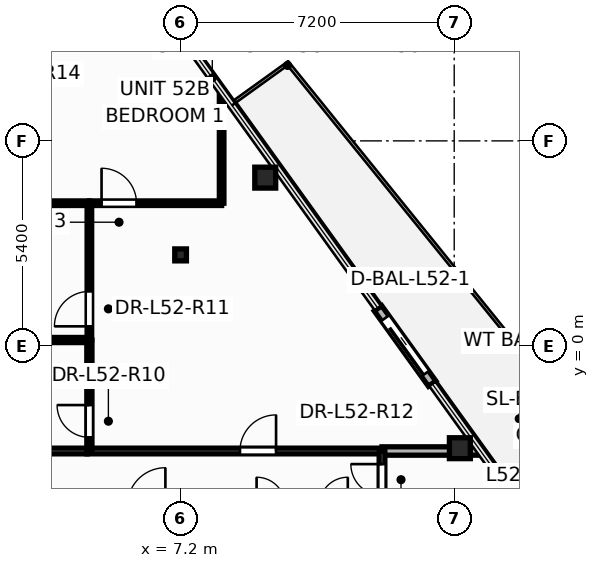
"""IFC4 building model, lengths in metres.
Left out: names, types, materials, properties, quantities, classifications, styles, units other than length and angle.
Written with IfcOpenShell. Run it as: python <this file> out.ifc"""

import sys

from ifc_helpers import new_model, si_unit, direction, frame, frame_2d, origin, origin_2d, place, context, subcontext, project, spatial, rectangle, hollow_circle, i_section, extrude, element, fill, save


model = new_model("IFC4")
c1 = context("Model", 3, precision=1e-05, world=origin(), true_north=direction((0.0, 1.0)))
c2 = subcontext(c1, "Body", "Model", "MODEL_VIEW")
j1 = project(units=[si_unit("LENGTHUNIT", "METRE"), si_unit("PLANEANGLEUNIT", "RADIAN")], contexts=[c1])
p1 = place(None, origin())
s1 = spatial("IfcSite", under=j1, at=p1, CompositionType="ELEMENT")
p2 = place(p1, origin())
s2 = spatial("IfcBuilding", under=s1, at=p2, CompositionType="ELEMENT")
p3 = place(p2, frame((0.0, 0.0, 200.1)))
s3 = spatial("IfcBuildingStorey", under=s2, at=p3, CompositionType="ELEMENT", Elevation=200.1)
for number, where, z_axis, x_axis in (
    (1, (14.549, -2.686, 0.0), (0.0, 0.0, 1.0), (1.0, 0.0, 0.0)),
    (2, (9.427, 4.433, 0.0), (0.0, 0.0, 1.0), (1.0, 0.0, 0.0)),
):
    element("IfcColumn", number, at=place(p3, frame(where, z_axis=z_axis, x_axis=x_axis)), inside=s3, PredefinedType="COLUMN", context=c2, shape_type="SweptSolid", body=[
        extrude(hollow_circle(Radius=0.275, WallThickness=0.024, at=origin_2d()), origin(), (0.0, 0.0, 1.0), 3.6),
    ])
p4 = place(p3, frame((7.2, 2.4, 0.0), z_axis=(0.0, 0.0, 1.0), x_axis=(1.0, 0.0, 0.0)))
e3 = element("IfcColumn", 3, at=p4, inside=s3, PredefinedType="COLUMN", context=c2, shape_type="SweptSolid", body=[
    extrude(i_section(OverallWidth=0.307, OverallDepth=0.314, WebThickness=0.012, FlangeThickness=0.019, at=origin_2d()), origin(), (0.0, 0.0, 1.0), 3.6),
])
p5 = place(p3, frame((13.819, -0.987, -0.015), z_axis=(0.0, 0.0, 1.0), x_axis=(-0.583951454754, 0.811788579921, 0.0)))
e4 = element("IfcWall", 4, at=p5, inside=s3, PredefinedType="STANDARD", context=c2, shape_type="SweptSolid", body=[
    extrude(rectangle(XDim=2.44, YDim=0.24, at=frame_2d((1.22, 0.0))), origin(), (0.0, 0.0, 1.0), 2.802),
])
p6 = place(p5, frame((0.32, 0.0, 0.015)))
e5 = element("IfcOpeningElement", 5, at=p6, cuts=e4, PredefinedType="OPENING", context=c2, shape_type="SweptSolid", body=[
    extrude(rectangle(XDim=1.806, YDim=2.204, at=frame_2d((0.9, 1.102))), frame((0.0, 0.13, 0.0), z_axis=(0.0, -1.0, 0.0), x_axis=(1.0, 0.0, 0.0)), (0.0, 0.0, 1.0), 0.26),
])
p7 = place(p3, frame((4.74, -2.76, 0.0), z_axis=(0.0, 0.0, 1.0), x_axis=(1.0, 0.0, 0.0)))
e6 = element("IfcWall", 6, at=p7, inside=s3, PredefinedType="PARTITIONING", context=c2, shape_type="SweptSolid", body=[
    extrude(rectangle(XDim=7.76, YDim=0.15, at=frame_2d((3.88, 0.0))), origin(), (0.0, 0.0, 1.0), 2.32),
])
p8 = place(p7, frame((4.022, 0.0, 0.0)))
e7 = element("IfcOpeningElement", 7, at=p8, cuts=e6, PredefinedType="OPENING", context=c2, shape_type="SweptSolid", body=[
    extrude(rectangle(XDim=0.956, YDim=2.104, at=frame_2d((0.475, 1.052))), frame((0.0, 0.085, 0.0), z_axis=(0.0, -1.0, 0.0), x_axis=(1.0, 0.0, 0.0)), (0.0, 0.0, 1.0), 0.17),
])
p9 = place(p3, frame((-4.058, 3.76, 0.0), z_axis=(0.0, 0.0, 1.0), x_axis=(1.0, 0.0, 0.0)))
e8 = element("IfcWall", 8, at=p9, inside=s3, PredefinedType="PARTITIONING", context=c2, shape_type="SweptSolid", body=[
    extrude(rectangle(XDim=8.858, YDim=0.12, at=frame_2d((4.429, 0.0))), origin(), (0.0, 0.0, 1.0), 2.32),
])
p10 = place(p3, frame((4.8, 0.16, 0.0), z_axis=(0.0, 0.0, 1.0), x_axis=(0.0, 1.0, 0.0)))
e9 = element("IfcWall", 9, at=p10, inside=s3, PredefinedType="PARTITIONING", context=c2, shape_type="SweptSolid", body=[
    extrude(rectangle(XDim=3.6, YDim=0.12, at=frame_2d((1.8, 0.0))), origin(), (0.0, 0.0, 1.0), 2.32),
])
p11 = place(p10, frame((0.36, 0.0, 0.0)))
e10 = element("IfcOpeningElement", 10, at=p11, cuts=e9, PredefinedType="OPENING", context=c2, shape_type="SweptSolid", body=[
    extrude(rectangle(XDim=0.926, YDim=2.104, at=frame_2d((0.46, 1.052))), frame((0.0, 0.07, 0.0), z_axis=(0.0, -1.0, 0.0), x_axis=(1.0, 0.0, 0.0)), (0.0, 0.0, 1.0), 0.14),
])
p12 = place(p3, frame((4.8, 3.76, 0.0), z_axis=(0.0, 0.0, 1.0), x_axis=(1.0, 0.0, 0.0)))
e11 = element("IfcWall", 11, at=p12, inside=s3, PredefinedType="PARTITIONING", context=c2, shape_type="SweptSolid", body=[
    extrude(rectangle(XDim=3.48, YDim=0.12, at=frame_2d((1.74, 0.0))), origin(), (0.0, 0.0, 1.0), 2.32),
])
p13 = place(p12, frame((0.32, 0.0, 0.0)))
e12 = element("IfcOpeningElement", 12, at=p13, cuts=e11, PredefinedType="OPENING", context=c2, shape_type="SweptSolid", body=[
    extrude(rectangle(XDim=0.926, YDim=2.104, at=frame_2d((0.46, 1.052))), frame((0.0, 0.07, 0.0), z_axis=(0.0, -1.0, 0.0), x_axis=(1.0, 0.0, 0.0)), (0.0, 0.0, 1.0), 0.14),
])
p14 = place(p3, frame((8.28, 3.76, 0.0), z_axis=(0.0, 0.0, 1.0), x_axis=(0.0, 1.0, 0.0)))
e13 = element("IfcWall", 13, at=p14, inside=s3, PredefinedType="PARTITIONING", context=c2, shape_type="SweptSolid", body=[
    extrude(rectangle(XDim=2.953, YDim=0.12, at=frame_2d((1.477, 0.0))), origin(), (0.0, 0.0, 1.0), 2.32),
])
p15 = place(p3, frame((4.8, -2.76, 0.0), z_axis=(0.0, 0.0, 1.0), x_axis=(0.0, 1.0, 0.0)))
e14 = element("IfcWall", 14, at=p15, inside=s3, PredefinedType="PARTITIONING", context=c2, shape_type="SweptSolid", body=[
    extrude(rectangle(XDim=2.92, YDim=0.135, at=frame_2d((1.46, 0.0))), origin(), (0.0, 0.0, 1.0), 3.345),
])
p16 = place(p15, frame((0.359, 0.0, 0.0)))
e15 = element("IfcOpeningElement", 15, at=p16, cuts=e14, PredefinedType="OPENING", context=c2, shape_type="SweptSolid", body=[
    extrude(rectangle(XDim=0.856, YDim=2.104, at=frame_2d((0.425, 1.052))), frame((0.0, 0.078, 0.0), z_axis=(0.0, -1.0, 0.0), x_axis=(1.0, 0.0, 0.0)), (0.0, 0.0, 1.0), 0.155),
])
p17 = place(p3, frame((-0.338, -2.76, 0.0), z_axis=(0.0, 0.0, 1.0), x_axis=(1.0, 0.0, 0.0)))
e16 = element("IfcWall", 16, at=p17, inside=s3, PredefinedType="PARTITIONING", context=c2, shape_type="SweptSolid", body=[
    extrude(rectangle(XDim=5.076, YDim=0.15, at=frame_2d((2.538, 0.0))), origin(), (0.0, 0.0, 1.0), 2.32),
])
p18 = place(p3, frame((-0.4, 0.16, 0.0), z_axis=(0.0, 0.0, 1.0), x_axis=(1.0, 0.0, 0.0)))
e17 = element("IfcWall", 17, at=p18, inside=s3, PredefinedType="PARTITIONING", context=c2, shape_type="SweptSolid", body=[
    extrude(rectangle(XDim=5.2, YDim=0.135, at=frame_2d((2.6, 0.0))), origin(), (0.0, 0.0, 1.0), 2.32),
])
p19 = place(p3, frame((12.5, -2.76, 0.0), z_axis=(0.0, 0.0, 1.0), x_axis=(1.0, 0.0, 0.0)))
e18 = element("IfcWall", 18, at=p19, inside=s3, PredefinedType="PARTITIONING", context=c2, shape_type="SweptSolid", body=[
    extrude(rectangle(XDim=2.595, YDim=0.22, at=frame_2d((1.297, 0.0))), origin(), (0.0, 0.0, 1.0), 2.32),
])
p20 = place(p3, frame((12.5, -4.24, 0.0), z_axis=(0.0, 0.0, 1.0), x_axis=(0.0, 1.0, 0.0)))
e19 = element("IfcWall", 19, at=p20, inside=s3, PredefinedType="PARTITIONING", context=c2, shape_type="SweptSolid", body=[
    extrude(rectangle(XDim=1.48, YDim=0.15, at=frame_2d((0.74, 0.0))), origin(), (0.0, 0.0, 1.0), 2.32),
])
p21 = place(p20, frame((0.315, 0.0, 0.0)))
e20 = element("IfcOpeningElement", 20, at=p21, cuts=e19, PredefinedType="OPENING", context=c2, shape_type="SweptSolid", body=[
    extrude(rectangle(XDim=0.826, YDim=2.104, at=frame_2d((0.41, 1.052))), frame((0.0, 0.085, 0.0), z_axis=(0.0, -1.0, 0.0), x_axis=(1.0, 0.0, 0.0)), (0.0, 0.0, 1.0), 0.17),
])
p22 = place(p6, origin())
e21 = element("IfcDoor", 21, at=p22, inside=s3, OperationType="SLIDING_TO_LEFT", PredefinedType="DOOR", context=c2, shape_type="SweptSolid", body=[
    extrude(rectangle(XDim=1.8, YDim=2.2, at=frame_2d((0.9, 1.1))), frame((0.0, 0.025, 0.0), z_axis=(0.0, -1.0, 0.0), x_axis=(1.0, 0.0, 0.0)), (0.0, 0.0, 1.0), 0.05),
])
fill(e5, e21)
p23 = place(p21, origin())
e22 = element("IfcDoor", 22, at=p23, inside=s3, OperationType="SINGLE_SWING_RIGHT", PredefinedType="DOOR", context=c2, shape_type="SweptSolid", body=[
    extrude(rectangle(XDim=0.82, YDim=2.1, at=frame_2d((0.41, 1.05))), frame((0.0, 0.025, 0.0), z_axis=(0.0, -1.0, 0.0), x_axis=(1.0, 0.0, 0.0)), (0.0, 0.0, 1.0), 0.05),
])
fill(e20, e22)
p24 = place(p16, origin())
e23 = element("IfcDoor", 23, at=p24, inside=s3, OperationType="SINGLE_SWING_RIGHT", PredefinedType="DOOR", context=c2, shape_type="SweptSolid", body=[
    extrude(rectangle(XDim=0.85, YDim=2.1, at=frame_2d((0.425, 1.05))), frame((0.0, 0.025, 0.0), z_axis=(0.0, -1.0, 0.0), x_axis=(1.0, 0.0, 0.0)), (0.0, 0.0, 1.0), 0.05),
])
fill(e15, e23)
p25 = place(p11, origin())
e24 = element("IfcDoor", 24, at=p25, inside=s3, OperationType="SINGLE_SWING_LEFT", PredefinedType="DOOR", context=c2, shape_type="SweptSolid", body=[
    extrude(rectangle(XDim=0.92, YDim=2.1, at=frame_2d((0.46, 1.05))), frame((0.0, 0.025, 0.0), z_axis=(0.0, -1.0, 0.0), x_axis=(1.0, 0.0, 0.0)), (0.0, 0.0, 1.0), 0.05),
])
fill(e10, e24)
p26 = place(p8, origin())
e25 = element("IfcDoor", 25, at=p26, inside=s3, OperationType="SINGLE_SWING_RIGHT", PredefinedType="DOOR", context=c2, shape_type="SweptSolid", body=[
    extrude(rectangle(XDim=0.95, YDim=2.1, at=frame_2d((0.475, 1.05))), frame((0.0, 0.025, 0.0), z_axis=(0.0, -1.0, 0.0), x_axis=(1.0, 0.0, 0.0)), (0.0, 0.0, 1.0), 0.05),
])
fill(e7, e25)
p27 = place(p13, origin())
e26 = element("IfcDoor", 26, at=p27, inside=s3, OperationType="SINGLE_SWING_LEFT", PredefinedType="DOOR", context=c2, shape_type="SweptSolid", body=[
    extrude(rectangle(XDim=0.92, YDim=2.1, at=frame_2d((0.46, 1.05))), frame((0.0, 0.025, 0.0), z_axis=(0.0, -1.0, 0.0), x_axis=(1.0, 0.0, 0.0)), (0.0, 0.0, 1.0), 0.05),
])
fill(e12, e26)
save(model, sys.argv[1])
